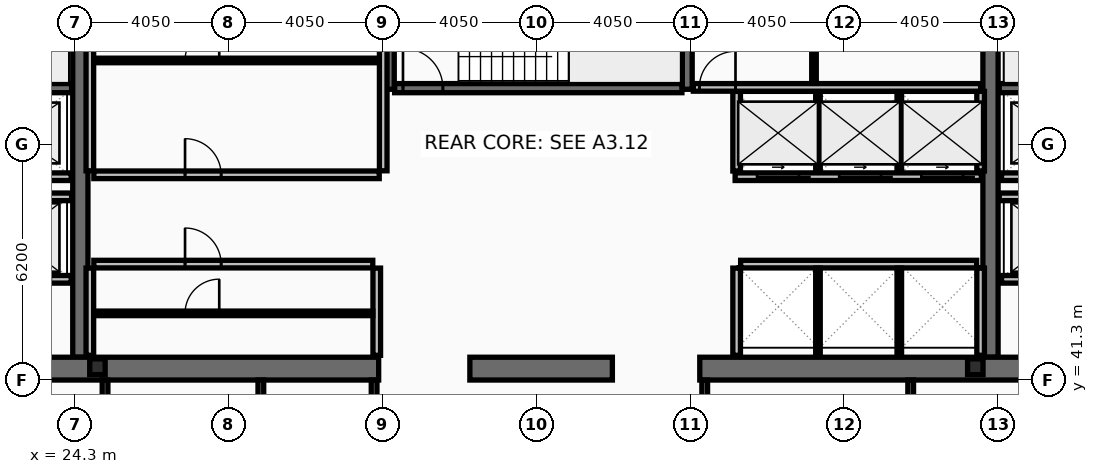
"""IFC4 building model, lengths in metres.
Left out: names, types, materials, properties, quantities, classifications, styles, units other than length and angle.
Written with IfcOpenShell. Run it as: python <this file> out.ifc"""

import sys

from ifc_helpers import new_model, si_unit, direction, frame, frame_2d, origin, origin_2d, place, context, subcontext, project, spatial, rectangle, i_section, extrude, element, fill, save


model = new_model("IFC4")
c1 = context("Model", 3, precision=1e-05, world=origin(), true_north=direction((0.0, 1.0)))
c2 = subcontext(c1, "Body", "Model", "MODEL_VIEW")
j1 = project(units=[si_unit("LENGTHUNIT", "METRE"), si_unit("PLANEANGLEUNIT", "RADIAN")], contexts=[c1])
p1 = place(None, origin())
s1 = spatial("IfcSite", under=j1, at=p1, CompositionType="ELEMENT")
p2 = place(p1, origin())
s2 = spatial("IfcBuilding", under=s1, at=p2, CompositionType="ELEMENT")
p3 = place(p2, frame((0.0, 0.0, 210.2)))
s3 = spatial("IfcBuildingStorey", under=s2, at=p3, CompositionType="ELEMENT", Elevation=210.2)
for number, where, z_axis, x_axis in (
    (1, (24.45, 41.9, 0.0), (0.0, 0.0, 1.0), (0.0, 1.0, 0.0)),
    (2, (48.4, 41.9, 0.0), (0.0, 0.0, 1.0), (0.0, 1.0, 0.0)),
):
    element("IfcWall", number, at=place(p3, frame(where, z_axis=z_axis, x_axis=x_axis)), inside=s3, PredefinedType="SHEAR", context=c2, shape_type="SweptSolid", body=[
        extrude(rectangle(XDim=11.2, YDim=0.4, at=frame_2d((5.6, 0.0))), origin(), (0.0, 0.0, 1.0), 3.44),
    ])
p4 = place(p3, frame((32.3, 41.6, 0.0), z_axis=(0.0, 0.0, 1.0), x_axis=(-1.0, 0.0, 0.0)))
e3 = element("IfcWall", 3, at=p4, inside=s3, PredefinedType="SHEAR", context=c2, shape_type="SweptSolid", body=[
    extrude(rectangle(XDim=11.45, YDim=0.6, at=frame_2d((5.725, 0.0))), origin(), (0.0, 0.0, 1.0), 3.44),
])
p5 = place(p3, frame((38.45, 41.6, 0.0), z_axis=(0.0, 0.0, 1.0), x_axis=(-1.0, 0.0, 0.0)))
e4 = element("IfcWall", 4, at=p5, inside=s3, PredefinedType="SHEAR", context=c2, shape_type="SweptSolid", body=[
    extrude(rectangle(XDim=3.75, YDim=0.6, at=frame_2d((1.875, 0.0))), origin(), (0.0, 0.0, 1.0), 3.44),
])
p6 = place(p3, frame((52.05, 41.6, 0.0), z_axis=(0.0, 0.0, 1.0), x_axis=(-1.0, 0.0, 0.0)))
e5 = element("IfcWall", 5, at=p6, inside=s3, PredefinedType="SHEAR", context=c2, shape_type="SweptSolid", body=[
    extrude(rectangle(XDim=11.3, YDim=0.6, at=frame_2d((5.65, 0.0))), origin(), (0.0, 0.0, 1.0), 3.44),
])
for number, where, z_axis, x_axis in (
    (6, (32.58, 48.95, 0.0), (0.0, 0.0, 1.0), (0.0, 1.0, 0.0)),
    (7, (40.42, 48.95, 0.0), (0.0, 0.0, 1.0), (0.0, 1.0, 0.0)),
):
    element("IfcWall", number, at=place(p3, frame(where, z_axis=z_axis, x_axis=x_axis)), inside=s3, PredefinedType="SHEAR", context=c2, shape_type="SweptSolid", body=[
        extrude(rectangle(XDim=4.15, YDim=0.26, at=frame_2d((2.075, 0.0))), origin(), (0.0, 0.0, 1.0), 3.44),
    ])
p7 = place(p3, frame((16.8, 48.98, 0.0), z_axis=(0.0, 0.0, 1.0), x_axis=(1.0, 0.0, 0.0)))
e8 = element("IfcWall", 8, at=p7, inside=s3, PredefinedType="SHEAR", context=c2, shape_type="SweptSolid", body=[
    extrude(rectangle(XDim=7.42, YDim=0.24, at=frame_2d((3.71, 0.0))), origin(), (0.0, 0.0, 1.0), 3.44),
])
p8 = place(p7, frame((0.22, 0.0, 0.0)))
e9 = element("IfcOpeningElement", 9, at=p8, cuts=e8, PredefinedType="OPENING", context=c2, shape_type="SweptSolid", body=[
    extrude(rectangle(XDim=1.05, YDim=2.15, at=frame_2d((0.525, 1.075))), frame((0.0, 0.13, 0.0), z_axis=(0.0, -1.0, 0.0), x_axis=(1.0, 0.0, 0.0)), (0.0, 0.0, 1.0), 0.26),
])
p9 = place(p3, frame((48.63, 48.98, 0.0), z_axis=(0.0, 0.0, 1.0), x_axis=(1.0, 0.0, 0.0)))
e10 = element("IfcWall", 10, at=p9, inside=s3, PredefinedType="SHEAR", context=c2, shape_type="SweptSolid", body=[
    extrude(rectangle(XDim=7.47, YDim=0.24, at=frame_2d((3.735, 0.0))), origin(), (0.0, 0.0, 1.0), 3.44),
])
p10 = place(p9, frame((6.2, 0.0, 0.0)))
e11 = element("IfcOpeningElement", 11, at=p10, cuts=e10, PredefinedType="OPENING", context=c2, shape_type="SweptSolid", body=[
    extrude(rectangle(XDim=1.05, YDim=2.15, at=frame_2d((0.525, 1.075))), frame((0.0, 0.13, 0.0), z_axis=(0.0, -1.0, 0.0), x_axis=(1.0, 0.0, 0.0)), (0.0, 0.0, 1.0), 0.26),
])
p11 = place(p3, frame((32.72, 48.98, 0.0), z_axis=(0.0, 0.0, 1.0), x_axis=(1.0, 0.0, 0.0)))
e12 = element("IfcWall", 12, at=p11, inside=s3, PredefinedType="SHEAR", context=c2, shape_type="SweptSolid", body=[
    extrude(rectangle(XDim=7.56, YDim=0.24, at=frame_2d((3.78, 0.0))), origin(), (0.0, 0.0, 1.0), 3.44),
])
p12 = place(p11, frame((0.22, 0.0, 0.0)))
e13 = element("IfcOpeningElement", 13, at=p12, cuts=e12, PredefinedType="OPENING", context=c2, shape_type="SweptSolid", body=[
    extrude(rectangle(XDim=1.05, YDim=2.15, at=frame_2d((0.525, 1.075))), frame((0.0, 0.13, 0.0), z_axis=(0.0, -1.0, 0.0), x_axis=(1.0, 0.0, 0.0)), (0.0, 0.0, 1.0), 0.26),
])
for number, where, z_axis, x_axis in (
    (14, (24.9, 41.65, 0.0), (0.0, 0.0, 1.0), (1.0, 0.0, 0.0)),
    (15, (48.0, 41.65, 0.0), (0.0, 0.0, 1.0), (1.0, 0.0, 0.0)),
):
    element("IfcColumn", number, at=place(p3, frame(where, z_axis=z_axis, x_axis=x_axis)), inside=s3, PredefinedType="COLUMN", context=c2, shape_type="SweptSolid", body=[
        extrude(i_section(OverallWidth=0.406, OverallDepth=0.416, WebThickness=0.03, FlangeThickness=0.048, at=origin_2d()), origin(), (0.0, 0.0, 1.0), 3.6),
    ])
p13 = place(p3, frame((51.61, 43.95, 0.0), z_axis=(0.0, 0.0, 1.0), x_axis=(-1.0, 0.0, 0.0)))
e16 = element("IfcWall", 16, at=p13, inside=s3, PredefinedType="PARTITIONING", context=c2, shape_type="SweptSolid", body=[
    extrude(rectangle(XDim=2.92, YDim=0.2, at=frame_2d((1.46, 0.0))), origin(), (0.0, 0.0, 1.0), 3.44),
])
p14 = place(p13, frame((0.81, 0.0, 0.0)))
e17 = element("IfcOpeningElement", 17, at=p14, cuts=e16, PredefinedType="OPENING", context=c2, shape_type="SweptSolid", body=[
    extrude(rectangle(XDim=1.3, YDim=2.18, at=frame_2d((0.65, 1.09))), frame((0.0, 0.11, 0.0), z_axis=(0.0, -1.0, 0.0), x_axis=(1.0, 0.0, 0.0)), (0.0, 0.0, 1.0), 0.22),
])
p15 = place(p3, frame((24.21, 43.95, 0.0), z_axis=(0.0, 0.0, 1.0), x_axis=(-1.0, 0.0, 0.0)))
e18 = element("IfcWall", 18, at=p15, inside=s3, PredefinedType="PARTITIONING", context=c2, shape_type="SweptSolid", body=[
    extrude(rectangle(XDim=2.97, YDim=0.2, at=frame_2d((1.485, 0.0))), origin(), (0.0, 0.0, 1.0), 3.44),
])
p16 = place(p15, frame((0.86, 0.0, 0.0)))
e19 = element("IfcOpeningElement", 19, at=p16, cuts=e18, PredefinedType="OPENING", context=c2, shape_type="SweptSolid", body=[
    extrude(rectangle(XDim=1.3, YDim=2.18, at=frame_2d((0.65, 1.09))), frame((0.0, 0.11, 0.0), z_axis=(0.0, -1.0, 0.0), x_axis=(1.0, 0.0, 0.0)), (0.0, 0.0, 1.0), 0.22),
])
p17 = place(p3, frame((51.61, 46.65, 0.0), z_axis=(0.0, 0.0, 1.0), x_axis=(-1.0, 0.0, 0.0)))
e20 = element("IfcWall", 20, at=p17, inside=s3, PredefinedType="PARTITIONING", context=c2, shape_type="SweptSolid", body=[
    extrude(rectangle(XDim=2.92, YDim=0.2, at=frame_2d((1.46, 0.0))), origin(), (0.0, 0.0, 1.0), 3.44),
])
p18 = place(p17, frame((0.86, 0.0, 0.0)))
e21 = element("IfcOpeningElement", 21, at=p18, cuts=e20, PredefinedType="OPENING", context=c2, shape_type="SweptSolid", body=[
    extrude(rectangle(XDim=1.2, YDim=2.18, at=frame_2d((0.6, 1.09))), frame((0.0, 0.11, 0.0), z_axis=(0.0, -1.0, 0.0), x_axis=(1.0, 0.0, 0.0)), (0.0, 0.0, 1.0), 0.22),
])
p19 = place(p3, frame((24.21, 46.65, 0.0), z_axis=(0.0, 0.0, 1.0), x_axis=(-1.0, 0.0, 0.0)))
e22 = element("IfcWall", 22, at=p19, inside=s3, PredefinedType="PARTITIONING", context=c2, shape_type="SweptSolid", body=[
    extrude(rectangle(XDim=2.97, YDim=0.2, at=frame_2d((1.485, 0.0))), origin(), (0.0, 0.0, 1.0), 3.44),
])
p20 = place(p19, frame((0.91, 0.0, 0.0)))
e23 = element("IfcOpeningElement", 23, at=p20, cuts=e22, PredefinedType="OPENING", context=c2, shape_type="SweptSolid", body=[
    extrude(rectangle(XDim=1.2, YDim=2.18, at=frame_2d((0.6, 1.09))), frame((0.0, 0.11, 0.0), z_axis=(0.0, -1.0, 0.0), x_axis=(1.0, 0.0, 0.0)), (0.0, 0.0, 1.0), 0.22),
])
p21 = place(p3, frame((48.16, 46.65, 0.0), z_axis=(0.0, 0.0, 1.0), x_axis=(-1.0, 0.0, 0.0)))
e24 = element("IfcWall", 24, at=p21, inside=s3, PredefinedType="PARTITIONING", context=c2, shape_type="SweptSolid", body=[
    extrude(rectangle(XDim=6.48, YDim=0.2, at=frame_2d((3.24, 0.0))), origin(), (0.0, 0.0, 1.0), 3.44),
])
p22 = place(p21, frame((4.8, 0.0, 0.0)))
e25 = element("IfcOpeningElement", 25, at=p22, cuts=e24, PredefinedType="OPENING", context=c2, shape_type="SweptSolid", body=[
    extrude(rectangle(XDim=1.1, YDim=2.18, at=frame_2d((0.55, 1.09))), frame((0.0, 0.11, 0.0), z_axis=(0.0, -1.0, 0.0), x_axis=(1.0, 0.0, 0.0)), (0.0, 0.0, 1.0), 0.22),
])
p23 = place(p21, frame((2.64, 0.0, 0.0)))
e26 = element("IfcOpeningElement", 26, at=p23, cuts=e24, PredefinedType="OPENING", context=c2, shape_type="SweptSolid", body=[
    extrude(rectangle(XDim=1.1, YDim=2.18, at=frame_2d((0.55, 1.09))), frame((0.0, 0.11, 0.0), z_axis=(0.0, -1.0, 0.0), x_axis=(1.0, 0.0, 0.0)), (0.0, 0.0, 1.0), 0.22),
])
p24 = place(p21, frame((0.48, 0.0, 0.0)))
e27 = element("IfcOpeningElement", 27, at=p24, cuts=e24, PredefinedType="OPENING", context=c2, shape_type="SweptSolid", body=[
    extrude(rectangle(XDim=1.1, YDim=2.18, at=frame_2d((0.55, 1.09))), frame((0.0, 0.11, 0.0), z_axis=(0.0, -1.0, 0.0), x_axis=(1.0, 0.0, 0.0)), (0.0, 0.0, 1.0), 0.22),
])
p25 = place(p3, frame((21.2, 46.12, 0.0), z_axis=(0.0, 0.0, 1.0), x_axis=(1.0, 0.0, 0.0)))
e28 = element("IfcWall", 28, at=p25, inside=s3, PredefinedType="PARTITIONING", context=c2, shape_type="SweptSolid", body=[
    extrude(rectangle(XDim=3.02, YDim=0.2, at=frame_2d((1.51, 0.0))), origin(), (0.0, 0.0, 1.0), 3.44),
])
p26 = place(p3, frame((48.63, 46.12, 0.0), z_axis=(0.0, 0.0, 1.0), x_axis=(1.0, 0.0, 0.0)))
e29 = element("IfcWall", 29, at=p26, inside=s3, PredefinedType="PARTITIONING", context=c2, shape_type="SweptSolid", body=[
    extrude(rectangle(XDim=3.07, YDim=0.2, at=frame_2d((1.535, 0.0))), origin(), (0.0, 0.0, 1.0), 3.44),
])
for number, where, z_axis, x_axis in (
    (30, (24.7, 46.805, 0.0), (0.0, 0.0, 1.0), (0.0, 1.0, 0.0)),
    (31, (32.42, 46.805, 0.0), (0.0, 0.0, 1.0), (0.0, 1.0, 0.0)),
):
    element("IfcWall", number, at=place(p3, frame(where, z_axis=z_axis, x_axis=x_axis)), inside=s3, PredefinedType="PARTITIONING", context=c2, shape_type="SweptSolid", body=[
        extrude(rectangle(XDim=5.99, YDim=0.2, at=frame_2d((2.995, 0.0))), origin(), (0.0, 0.0, 1.0), 3.44),
    ])
p27 = place(p3, frame((24.805, 49.709, 0.0), z_axis=(0.0, 0.0, 1.0), x_axis=(1.0, 0.0, 0.0)))
e32 = element("IfcWall", 32, at=p27, inside=s3, PredefinedType="PARTITIONING", context=c2, shape_type="SweptSolid", body=[
    extrude(rectangle(XDim=7.51, YDim=0.12, at=frame_2d((3.755, 0.0))), origin(), (0.0, 0.0, 1.0), 3.44),
])
p28 = place(p27, frame((2.4, 0.0, 0.0)))
e33 = element("IfcOpeningElement", 33, at=p28, cuts=e32, PredefinedType="OPENING", context=c2, shape_type="SweptSolid", body=[
    extrude(rectangle(XDim=0.9, YDim=2.05, at=frame_2d((0.45, 1.025))), frame((0.0, 0.07, 0.0), z_axis=(0.0, -1.0, 0.0), x_axis=(1.0, 0.0, 0.0)), (0.0, 0.0, 1.0), 0.14),
])
p29 = place(p3, frame((24.805, 46.7, 0.0), z_axis=(0.0, 0.0, 1.0), x_axis=(1.0, 0.0, 0.0)))
e34 = element("IfcWall", 34, at=p29, inside=s3, PredefinedType="PARTITIONING", context=c2, shape_type="SweptSolid", body=[
    extrude(rectangle(XDim=7.51, YDim=0.2, at=frame_2d((3.755, 0.0))), origin(), (0.0, 0.0, 1.0), 3.44),
])
p30 = place(p29, frame((2.4, 0.0, 0.0)))
e35 = element("IfcOpeningElement", 35, at=p30, cuts=e34, PredefinedType="OPENING", context=c2, shape_type="SweptSolid", body=[
    extrude(rectangle(XDim=0.95, YDim=2.1, at=frame_2d((0.475, 1.05))), frame((0.0, 0.11, 0.0), z_axis=(0.0, -1.0, 0.0), x_axis=(1.0, 0.0, 0.0)), (0.0, 0.0, 1.0), 0.22),
])
for number, where, z_axis, x_axis in (
    (36, (24.7, 41.95, 0.0), (0.0, 0.0, 1.0), (0.0, 1.0, 0.0)),
    (37, (32.25, 41.95, 0.0), (0.0, 0.0, 1.0), (0.0, 1.0, 0.0)),
):
    element("IfcWall", number, at=place(p3, frame(where, z_axis=z_axis, x_axis=x_axis)), inside=s3, PredefinedType="PARTITIONING", context=c2, shape_type="SweptSolid", body=[
        extrude(rectangle(XDim=2.295, YDim=0.2, at=frame_2d((1.147, 0.0))), origin(), (0.0, 0.0, 1.0), 3.44),
    ])
p31 = place(p3, frame((24.805, 43.054, 0.0), z_axis=(0.0, 0.0, 1.0), x_axis=(1.0, 0.0, 0.0)))
e38 = element("IfcWall", 38, at=p31, inside=s3, PredefinedType="PARTITIONING", context=c2, shape_type="SweptSolid", body=[
    extrude(rectangle(XDim=7.34, YDim=0.12, at=frame_2d((3.67, 0.0))), origin(), (0.0, 0.0, 1.0), 3.44),
])
p32 = place(p31, frame((2.4, 0.0, 0.0)))
e39 = element("IfcOpeningElement", 39, at=p32, cuts=e38, PredefinedType="OPENING", context=c2, shape_type="SweptSolid", body=[
    extrude(rectangle(XDim=0.9, YDim=2.05, at=frame_2d((0.45, 1.025))), frame((0.0, 0.07, 0.0), z_axis=(0.0, -1.0, 0.0), x_axis=(1.0, 0.0, 0.0)), (0.0, 0.0, 1.0), 0.14),
])
p33 = place(p3, frame((24.805, 44.35, 0.0), z_axis=(0.0, 0.0, 1.0), x_axis=(1.0, 0.0, 0.0)))
e40 = element("IfcWall", 40, at=p33, inside=s3, PredefinedType="PARTITIONING", context=c2, shape_type="SweptSolid", body=[
    extrude(rectangle(XDim=7.34, YDim=0.2, at=frame_2d((3.67, 0.0))), origin(), (0.0, 0.0, 1.0), 3.44),
])
p34 = place(p33, frame((2.4, 0.0, 0.0)))
e41 = element("IfcOpeningElement", 41, at=p34, cuts=e40, PredefinedType="OPENING", context=c2, shape_type="SweptSolid", body=[
    extrude(rectangle(XDim=0.95, YDim=2.1, at=frame_2d((0.475, 1.05))), frame((0.0, 0.11, 0.0), z_axis=(0.0, -1.0, 0.0), x_axis=(1.0, 0.0, 0.0)), (0.0, 0.0, 1.0), 0.22),
])
for number, where, z_axis, x_axis in (
    (42, (41.72, 46.8, 0.0), (0.0, 0.0, 1.0), (0.0, 1.0, 0.0)),
    (43, (48.14, 46.8, 0.0), (0.0, 0.0, 1.0), (0.0, 1.0, 0.0)),
):
    element("IfcWall", number, at=place(p3, frame(where, z_axis=z_axis, x_axis=x_axis)), inside=s3, PredefinedType="PARTITIONING", context=c2, shape_type="SweptSolid", body=[
        extrude(rectangle(XDim=2.095, YDim=0.2, at=frame_2d((1.047, 0.0))), origin(), (0.0, 0.0, 1.0), 3.44),
    ])
for number, where, z_axis, x_axis in (
    (44, (43.86, 46.8, 0.0), (0.0, 0.0, 1.0), (0.0, 1.0, 0.0)),
    (45, (46.0, 46.8, 0.0), (0.0, 0.0, 1.0), (0.0, 1.0, 0.0)),
):
    element("IfcWall", number, at=place(p3, frame(where, z_axis=z_axis, x_axis=x_axis)), inside=s3, PredefinedType="PARTITIONING", context=c2, shape_type="SweptSolid", body=[
        extrude(rectangle(XDim=2.095, YDim=0.12, at=frame_2d((1.047, 0.0))), origin(), (0.0, 0.0, 1.0), 3.44),
    ])
p35 = place(p3, frame((41.825, 44.35, 0.0), z_axis=(0.0, 0.0, 1.0), x_axis=(1.0, 0.0, 0.0)))
e46 = element("IfcWall", 46, at=p35, inside=s3, PredefinedType="PARTITIONING", context=c2, shape_type="SweptSolid", body=[
    extrude(rectangle(XDim=6.21, YDim=0.2, at=frame_2d((3.105, 0.0))), origin(), (0.0, 0.0, 1.0), 3.44),
])
for number, where, z_axis, x_axis in (
    (47, (41.72, 41.95, 0.0), (0.0, 0.0, 1.0), (0.0, 1.0, 0.0)),
    (48, (48.14, 41.95, 0.0), (0.0, 0.0, 1.0), (0.0, 1.0, 0.0)),
):
    element("IfcWall", number, at=place(p3, frame(where, z_axis=z_axis, x_axis=x_axis)), inside=s3, PredefinedType="PARTITIONING", context=c2, shape_type="SweptSolid", body=[
        extrude(rectangle(XDim=2.295, YDim=0.2, at=frame_2d((1.147, 0.0))), origin(), (0.0, 0.0, 1.0), 3.44),
    ])
for number, where, z_axis, x_axis in (
    (49, (43.86, 41.95, 0.0), (0.0, 0.0, 1.0), (0.0, 1.0, 0.0)),
    (50, (46.0, 41.95, 0.0), (0.0, 0.0, 1.0), (0.0, 1.0, 0.0)),
):
    element("IfcWall", number, at=place(p3, frame(where, z_axis=z_axis, x_axis=x_axis)), inside=s3, PredefinedType="PARTITIONING", context=c2, shape_type="SweptSolid", body=[
        extrude(rectangle(XDim=2.295, YDim=0.12, at=frame_2d((1.147, 0.0))), origin(), (0.0, 0.0, 1.0), 3.44),
    ])
p36 = place(p3, frame((40.58, 49.0, 0.0), z_axis=(0.0, 0.0, 1.0), x_axis=(1.0, 0.0, 0.0)))
e51 = element("IfcWall", 51, at=p36, inside=s3, PredefinedType="PARTITIONING", context=c2, shape_type="SweptSolid", body=[
    extrude(rectangle(XDim=7.56, YDim=0.2, at=frame_2d((3.78, 0.0))), origin(), (0.0, 0.0, 1.0), 3.44),
])
p37 = place(p36, frame((0.16, 0.0, 0.0)))
e52 = element("IfcOpeningElement", 52, at=p37, cuts=e51, PredefinedType="OPENING", context=c2, shape_type="SweptSolid", body=[
    extrude(rectangle(XDim=0.95, YDim=2.1, at=frame_2d((0.475, 1.05))), frame((0.0, 0.11, 0.0), z_axis=(0.0, -1.0, 0.0), x_axis=(1.0, 0.0, 0.0)), (0.0, 0.0, 1.0), 0.22),
])
p38 = place(p3, frame((43.755, 49.105, 0.0), z_axis=(0.0, 0.0, 1.0), x_axis=(0.0, 1.0, 0.0)))
e53 = element("IfcWall", 53, at=p38, inside=s3, PredefinedType="PARTITIONING", context=c2, shape_type="SweptSolid", body=[
    extrude(rectangle(XDim=3.69, YDim=0.12, at=frame_2d((1.845, 0.0))), origin(), (0.0, 0.0, 1.0), 3.44),
])
p39 = place(p38, frame((1.05, 0.0, 0.0)))
e54 = element("IfcOpeningElement", 54, at=p39, cuts=e53, PredefinedType="OPENING", context=c2, shape_type="SweptSolid", body=[
    extrude(rectangle(XDim=0.9, YDim=2.05, at=frame_2d((0.45, 1.025))), frame((0.0, 0.07, 0.0), z_axis=(0.0, -1.0, 0.0), x_axis=(1.0, 0.0, 0.0)), (0.0, 0.0, 1.0), 0.14),
])
p40 = place(p3, frame((25.1, 38.28, 0.0), z_axis=(0.0, 0.0, 1.0), x_axis=(0.0, 1.0, 0.0)))
e55 = element("IfcWall", 55, at=p40, inside=s3, PredefinedType="PARTITIONING", context=c2, shape_type="SweptSolid", body=[
    extrude(rectangle(XDim=3.02, YDim=0.15, at=frame_2d((1.51, 0.0))), origin(), (0.0, 0.0, 1.0), 2.73),
])
for number, where, z_axis, x_axis in (
    (56, (29.2, 38.28, 0.0), (0.0, 0.0, 1.0), (0.0, 1.0, 0.0)),
    (57, (32.18, 38.28, 0.0), (0.0, 0.0, 1.0), (0.0, 1.0, 0.0)),
    (58, (40.88, 38.28, 0.0), (0.0, 0.0, 1.0), (0.0, 1.0, 0.0)),
    (59, (46.3, 38.28, 0.0), (0.0, 0.0, 1.0), (0.0, 1.0, 0.0)),
):
    element("IfcWall", number, at=place(p3, frame(where, z_axis=z_axis, x_axis=x_axis)), inside=s3, PredefinedType="PARTITIONING", context=c2, shape_type="SweptSolid", body=[
        extrude(rectangle(XDim=3.02, YDim=0.15, at=frame_2d((1.51, 0.0))), origin(), (0.0, 0.0, 1.0), 3.44),
    ])
p41 = place(p12, origin())
e60 = element("IfcDoor", 60, at=p41, inside=s3, OperationType="SINGLE_SWING_LEFT", PredefinedType="DOOR", context=c2, shape_type="SweptSolid", body=[
    extrude(rectangle(XDim=1.05, YDim=2.15, at=frame_2d((0.525, 1.075))), frame((0.0, 0.025, 0.0), z_axis=(0.0, -1.0, 0.0), x_axis=(1.0, 0.0, 0.0)), (0.0, 0.0, 1.0), 0.05),
])
fill(e13, e60)
p42 = place(p22, origin())
e61 = element("IfcDoor", 61, at=p42, inside=s3, OperationType="SLIDING_TO_LEFT", PredefinedType="DOOR", context=c2, shape_type="SweptSolid", body=[
    extrude(rectangle(XDim=1.1, YDim=2.18, at=frame_2d((0.55, 1.09))), frame((0.0, 0.025, 0.0), z_axis=(0.0, -1.0, 0.0), x_axis=(1.0, 0.0, 0.0)), (0.0, 0.0, 1.0), 0.05),
])
fill(e25, e61)
p43 = place(p23, origin())
e62 = element("IfcDoor", 62, at=p43, inside=s3, OperationType="SLIDING_TO_LEFT", PredefinedType="DOOR", context=c2, shape_type="SweptSolid", body=[
    extrude(rectangle(XDim=1.1, YDim=2.18, at=frame_2d((0.55, 1.09))), frame((0.0, 0.025, 0.0), z_axis=(0.0, -1.0, 0.0), x_axis=(1.0, 0.0, 0.0)), (0.0, 0.0, 1.0), 0.05),
])
fill(e26, e62)
p44 = place(p24, origin())
e63 = element("IfcDoor", 63, at=p44, inside=s3, OperationType="SLIDING_TO_LEFT", PredefinedType="DOOR", context=c2, shape_type="SweptSolid", body=[
    extrude(rectangle(XDim=1.1, YDim=2.18, at=frame_2d((0.55, 1.09))), frame((0.0, 0.025, 0.0), z_axis=(0.0, -1.0, 0.0), x_axis=(1.0, 0.0, 0.0)), (0.0, 0.0, 1.0), 0.05),
])
fill(e27, e63)
p45 = place(p28, origin())
e64 = element("IfcDoor", 64, at=p45, inside=s3, OperationType="SINGLE_SWING_RIGHT", PredefinedType="DOOR", context=c2, shape_type="SweptSolid", body=[
    extrude(rectangle(XDim=0.9, YDim=2.05, at=frame_2d((0.45, 1.025))), frame((0.0, 0.025, 0.0), z_axis=(0.0, -1.0, 0.0), x_axis=(1.0, 0.0, 0.0)), (0.0, 0.0, 1.0), 0.05),
])
fill(e33, e64)
p46 = place(p30, origin())
e65 = element("IfcDoor", 65, at=p46, inside=s3, OperationType="SINGLE_SWING_LEFT", PredefinedType="DOOR", context=c2, shape_type="SweptSolid", body=[
    extrude(rectangle(XDim=0.95, YDim=2.1, at=frame_2d((0.475, 1.05))), frame((0.0, 0.025, 0.0), z_axis=(0.0, -1.0, 0.0), x_axis=(1.0, 0.0, 0.0)), (0.0, 0.0, 1.0), 0.05),
])
fill(e35, e65)
p47 = place(p32, origin())
e66 = element("IfcDoor", 66, at=p47, inside=s3, OperationType="SINGLE_SWING_RIGHT", PredefinedType="DOOR", context=c2, shape_type="SweptSolid", body=[
    extrude(rectangle(XDim=0.9, YDim=2.05, at=frame_2d((0.45, 1.025))), frame((0.0, 0.025, 0.0), z_axis=(0.0, -1.0, 0.0), x_axis=(1.0, 0.0, 0.0)), (0.0, 0.0, 1.0), 0.05),
])
fill(e39, e66)
p48 = place(p34, origin())
e67 = element("IfcDoor", 67, at=p48, inside=s3, OperationType="SINGLE_SWING_LEFT", PredefinedType="DOOR", context=c2, shape_type="SweptSolid", body=[
    extrude(rectangle(XDim=0.95, YDim=2.1, at=frame_2d((0.475, 1.05))), frame((0.0, 0.025, 0.0), z_axis=(0.0, -1.0, 0.0), x_axis=(1.0, 0.0, 0.0)), (0.0, 0.0, 1.0), 0.05),
])
fill(e41, e67)
p49 = place(p37, origin())
e68 = element("IfcDoor", 68, at=p49, inside=s3, OperationType="SINGLE_SWING_RIGHT", PredefinedType="DOOR", context=c2, shape_type="SweptSolid", body=[
    extrude(rectangle(XDim=0.95, YDim=2.1, at=frame_2d((0.475, 1.05))), frame((0.0, 0.025, 0.0), z_axis=(0.0, -1.0, 0.0), x_axis=(1.0, 0.0, 0.0)), (0.0, 0.0, 1.0), 0.05),
])
fill(e52, e68)
save(model, sys.argv[1])
